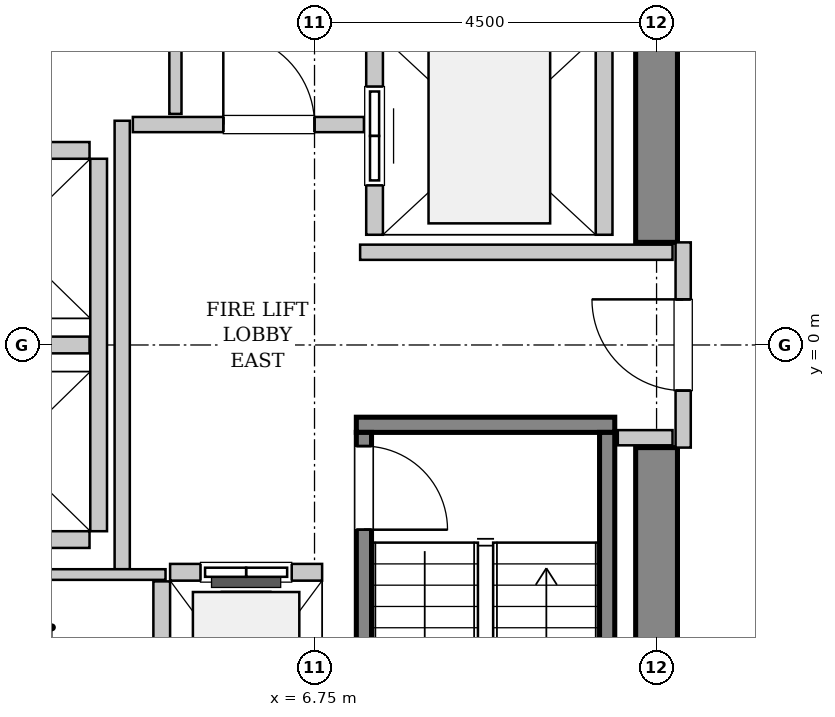
"""IFC4 building model, lengths in metres.
Left out: names, types, materials, properties, quantities, classifications, styles, units other than length and angle.
Written with IfcOpenShell. Run it as: python <this file> out.ifc"""

import sys

from ifc_helpers import new_model, si_unit, direction, frame, frame_2d, origin, place, context, subcontext, project, spatial, rectangle, extrude, source, transform, mapped, element, fill, save


model = new_model("IFC4")
c1 = context("Model", 3, precision=1e-05, world=origin(), true_north=direction((0.0, 1.0)))
c2 = subcontext(c1, "Body", "Model", "MODEL_VIEW")
j1 = project(units=[si_unit("LENGTHUNIT", "METRE"), si_unit("PLANEANGLEUNIT", "RADIAN")], contexts=[c1])
p1 = place(None, origin())
s1 = spatial("IfcSite", under=j1, at=p1, CompositionType="ELEMENT")
p2 = place(p1, origin())
s2 = spatial("IfcBuilding", under=s1, at=p2, CompositionType="ELEMENT")
p3 = place(p2, frame((0.0, 0.0, 121.2)))
s3 = spatial("IfcBuildingStorey", under=s2, at=p3, CompositionType="ELEMENT", Elevation=121.2)
m1 = source(origin(), c2, "Body", "SweptSolid", [
    extrude(rectangle(XDim=7.375, YDim=0.55, at=frame_2d((3.688, 0.0))), origin(), (0.0, 0.0, 1.0), 3.8),
])
for number, where, z_axis, x_axis in (
    (1, (11.25, -8.725, 0.0), (0.0, 0.0, 1.0), (0.0, 1.0, 0.0)),
    (2, (11.25, 1.35, 0.0), (0.0, 0.0, 1.0), (0.0, 1.0, 0.0)),
):
    element("IfcWall", number, at=place(p3, frame(where, z_axis=z_axis, x_axis=x_axis)), inside=s3, PredefinedType="SHEAR", context=c2, shape_type="MappedRepresentation", body=[
        mapped(m1, transform((0.0, 0.0, 0.0), x_axis=(1.0, 0.0, 0.0), y_axis=(0.0, 1.0, 0.0), z_axis=(0.0, 0.0, 1.0), scale=1.0)),
    ])
m2 = source(origin(), c2, "Body", "SweptSolid", [
    extrude(rectangle(XDim=3.4, YDim=0.2, at=frame_2d((1.7, 0.0))), origin(), (0.0, 0.0, 1.0), 3.8),
])
p4 = place(p3, frame((7.3, -1.05, 0.0), z_axis=(0.0, 0.0, 1.0), x_axis=(1.0, 0.0, 0.0)))
e3 = element("IfcWall", 3, at=p4, inside=s3, PredefinedType="SOLIDWALL", context=c2, shape_type="MappedRepresentation", body=[
    mapped(m2, transform((0.0, 0.0, 0.0), x_axis=(1.0, 0.0, 0.0), y_axis=(0.0, 1.0, 0.0), z_axis=(0.0, 0.0, 1.0), scale=1.0)),
])
m3 = source(origin(), c2, "Body", "SweptSolid", [
    extrude(rectangle(XDim=7.1, YDim=0.2, at=frame_2d((3.55, 0.0))), origin(), (0.0, 0.0, 1.0), 3.8),
])
p5 = place(p3, frame((7.4, -1.15, 0.0), z_axis=(0.0, 0.0, 1.0), x_axis=(0.0, -1.0, 0.0)))
e4 = element("IfcWall", 4, at=p5, inside=s3, PredefinedType="SOLIDWALL", context=c2, shape_type="MappedRepresentation", body=[
    mapped(m3, transform((0.0, 0.0, 0.0), x_axis=(1.0, 0.0, 0.0), y_axis=(0.0, 1.0, 0.0), z_axis=(0.0, 0.0, 1.0), scale=1.0)),
])
p6 = place(p5, frame((0.18, 0.0, 0.0)))
e5 = element("IfcOpeningElement", 5, at=p6, cuts=e4, PredefinedType="OPENING", context=c2, shape_type="SweptSolid", body=[
    extrude(rectangle(XDim=1.1, YDim=2.15, at=frame_2d((0.55, 1.075))), frame((0.0, 0.11, 0.0), z_axis=(0.0, -1.0, 0.0), x_axis=(1.0, 0.0, 0.0)), (0.0, 0.0, 1.0), 0.22),
])
p7 = place(p3, frame((10.6, -1.15, 0.0), z_axis=(0.0, 0.0, 1.0), x_axis=(0.0, -1.0, 0.0)))
e6 = element("IfcWall", 6, at=p7, inside=s3, PredefinedType="SOLIDWALL", context=c2, shape_type="MappedRepresentation", body=[
    mapped(m3, transform((0.0, 0.0, 0.0), x_axis=(1.0, 0.0, 0.0), y_axis=(0.0, 1.0, 0.0), z_axis=(0.0, 0.0, 1.0), scale=1.0)),
])
m4 = source(origin(), c2, "Body", "SweptSolid", [
    extrude(rectangle(XDim=2.0, YDim=0.22, at=frame_2d((1.0, 0.0))), origin(), (0.0, 0.0, 1.0), 3.535),
])
p8 = place(p3, frame((6.85, -2.99, 0.0), z_axis=(0.0, 0.0, 1.0), x_axis=(-1.0, 0.0, 0.0)))
e7 = element("IfcWall", 7, at=p8, inside=s3, PredefinedType="SOLIDWALL", context=c2, shape_type="MappedRepresentation", body=[
    mapped(m4, transform((0.0, 0.0, 0.0), x_axis=(1.0, 0.0, 0.0), y_axis=(0.0, 1.0, 0.0), z_axis=(0.0, 0.0, 1.0), scale=1.0)),
])
p9 = place(p8, frame((0.4, 0.0, 0.0)))
e8 = element("IfcOpeningElement", 8, at=p9, cuts=e7, PredefinedType="OPENING", context=c2, shape_type="SweptSolid", body=[
    extrude(rectangle(XDim=1.2, YDim=2.2, at=frame_2d((0.6, 1.1))), frame((0.0, 0.12, 0.0), z_axis=(0.0, -1.0, 0.0), x_axis=(1.0, 0.0, 0.0)), (0.0, 0.0, 1.0), 0.24),
])
m5 = source(origin(), c2, "Body", "SweptSolid", [
    extrude(rectangle(XDim=2.68, YDim=0.22, at=frame_2d((1.34, 0.0))), origin(), (0.0, 0.0, 1.0), 3.535),
])
p10 = place(p3, frame((4.74, -3.11, 0.0), z_axis=(0.0, 0.0, 1.0), x_axis=(0.0, -1.0, 0.0)))
e9 = element("IfcWall", 9, at=p10, inside=s3, PredefinedType="SOLIDWALL", context=c2, shape_type="MappedRepresentation", body=[
    mapped(m5, transform((0.0, 0.0, 0.0), x_axis=(1.0, 0.0, 0.0), y_axis=(0.0, 1.0, 0.0), z_axis=(0.0, 0.0, 1.0), scale=1.0)),
])
m6 = source(origin(), c2, "Body", "SweptSolid", [
    extrude(rectangle(XDim=5.45, YDim=0.22, at=frame_2d((2.725, 0.0))), origin(), (0.0, 0.0, 1.0), 3.535),
])
p11 = place(p3, frame((7.54, 6.9, 0.0), z_axis=(0.0, 0.0, 1.0), x_axis=(0.0, -1.0, 0.0)))
e10 = element("IfcWall", 10, at=p11, inside=s3, PredefinedType="SOLIDWALL", context=c2, shape_type="MappedRepresentation", body=[
    mapped(m6, transform((0.0, 0.0, 0.0), x_axis=(1.0, 0.0, 0.0), y_axis=(0.0, 1.0, 0.0), z_axis=(0.0, 0.0, 1.0), scale=1.0)),
])
p12 = place(p11, frame((3.5, 0.0, 0.0)))
e11 = element("IfcOpeningElement", 11, at=p12, cuts=e10, PredefinedType="OPENING", context=c2, shape_type="SweptSolid", body=[
    extrude(rectangle(XDim=1.3, YDim=2.3, at=frame_2d((0.65, 1.15))), frame((0.0, 0.12, 0.0), z_axis=(0.0, -1.0, 0.0), x_axis=(1.0, 0.0, 0.0)), (0.0, 0.0, 1.0), 0.24),
])
p13 = place(p11, frame((0.65, 0.0, 0.0)))
e12 = element("IfcOpeningElement", 12, at=p13, cuts=e10, PredefinedType="OPENING", context=c2, shape_type="SweptSolid", body=[
    extrude(rectangle(XDim=1.3, YDim=2.3, at=frame_2d((0.65, 1.15))), frame((0.0, 0.12, 0.0), z_axis=(0.0, -1.0, 0.0), x_axis=(1.0, 0.0, 0.0)), (0.0, 0.0, 1.0), 0.24),
])
p14 = place(p3, frame((10.56, 1.45, 0.0), z_axis=(0.0, 0.0, 1.0), x_axis=(0.0, 1.0, 0.0)))
e13 = element("IfcWall", 13, at=p14, inside=s3, PredefinedType="SOLIDWALL", context=c2, shape_type="MappedRepresentation", body=[
    mapped(m6, transform((0.0, 0.0, 0.0), x_axis=(1.0, 0.0, 0.0), y_axis=(0.0, 1.0, 0.0), z_axis=(0.0, 0.0, 1.0), scale=1.0)),
])
m7 = source(origin(), c2, "Body", "SweptSolid", [
    extrude(rectangle(XDim=4.9, YDim=0.22, at=frame_2d((2.45, 0.0))), origin(), (0.0, 0.0, 1.0), 3.535),
])
p15 = place(p3, frame((3.91, -2.45, 0.0), z_axis=(0.0, 0.0, 1.0), x_axis=(0.0, 1.0, 0.0)))
e14 = element("IfcWall", 14, at=p15, inside=s3, PredefinedType="SOLIDWALL", context=c2, shape_type="MappedRepresentation", body=[
    mapped(m7, transform((0.0, 0.0, 0.0), x_axis=(1.0, 0.0, 0.0), y_axis=(0.0, 1.0, 0.0), z_axis=(0.0, 0.0, 1.0), scale=1.0)),
])
m8 = source(origin(), c2, "Body", "SweptSolid", [
    extrude(rectangle(XDim=2.13, YDim=0.22, at=frame_2d((1.065, 0.0))), origin(), (0.0, 0.0, 1.0), 3.535),
])
for number, where, z_axis, x_axis in (
    (15, (1.66, -2.56, 0.0), (0.0, 0.0, 1.0), (1.0, 0.0, 0.0)),
    (16, (1.66, 0.0, 0.0), (0.0, 0.0, 1.0), (1.0, 0.0, 0.0)),
    (17, (3.79, 2.56, 0.0), (0.0, 0.0, 1.0), (-1.0, 0.0, 0.0)),
):
    element("IfcWall", number, at=place(p3, frame(where, z_axis=z_axis, x_axis=x_axis)), inside=s3, PredefinedType="SOLIDWALL", context=c2, shape_type="MappedRepresentation", body=[
        mapped(m8, transform((0.0, 0.0, 0.0), x_axis=(1.0, 0.0, 0.0), y_axis=(0.0, 1.0, 0.0), z_axis=(0.0, 0.0, 1.0), scale=1.0)),
    ])
m9 = source(origin(), c2, "Body", "SweptSolid", [
    extrude(rectangle(XDim=2.7, YDim=0.2, at=frame_2d((1.35, 0.0))), origin(), (0.0, 0.0, 1.0), 2.425),
])
p16 = place(p3, frame((11.6, -1.35, 0.0), z_axis=(0.0, 0.0, 1.0), x_axis=(0.0, 1.0, 0.0)))
e18 = element("IfcWall", 18, at=p16, inside=s3, PredefinedType="PARTITIONING", context=c2, shape_type="MappedRepresentation", body=[
    mapped(m9, transform((0.0, 0.0, 0.0), x_axis=(1.0, 0.0, 0.0), y_axis=(0.0, 1.0, 0.0), z_axis=(0.0, 0.0, 1.0), scale=1.0)),
])
p17 = place(p16, frame((0.75, 0.0, 0.0)))
e19 = element("IfcOpeningElement", 19, at=p17, cuts=e18, PredefinedType="OPENING", context=c2, shape_type="SweptSolid", body=[
    extrude(rectangle(XDim=1.2, YDim=2.15, at=frame_2d((0.6, 1.075))), frame((0.0, 0.11, 0.0), z_axis=(0.0, -1.0, 0.0), x_axis=(1.0, 0.0, 0.0)), (0.0, 0.0, 1.0), 0.22),
])
m10 = source(origin(), c2, "Body", "SweptSolid", [
    extrude(rectangle(XDim=5.9, YDim=0.2, at=frame_2d((2.95, 0.0))), origin(), (0.0, 0.0, 1.0), 3.535),
])
p18 = place(p3, frame((4.22, -2.95, 0.0), z_axis=(0.0, 0.0, 1.0), x_axis=(0.0, 1.0, 0.0)))
e20 = element("IfcWall", 20, at=p18, inside=s3, PredefinedType="PARTITIONING", context=c2, shape_type="MappedRepresentation", body=[
    mapped(m10, transform((0.0, 0.0, 0.0), x_axis=(1.0, 0.0, 0.0), y_axis=(0.0, 1.0, 0.0), z_axis=(0.0, 0.0, 1.0), scale=1.0)),
])
m11 = source(origin(), c2, "Body", "SweptSolid", [
    extrude(rectangle(XDim=3.04, YDim=0.2, at=frame_2d((1.52, 0.0))), origin(), (0.0, 0.0, 1.0), 3.535),
])
p19 = place(p3, frame((4.36, 2.9, 0.0), z_axis=(0.0, 0.0, 1.0), x_axis=(1.0, 0.0, 0.0)))
e21 = element("IfcWall", 21, at=p19, inside=s3, PredefinedType="PARTITIONING", context=c2, shape_type="MappedRepresentation", body=[
    mapped(m11, transform((0.0, 0.0, 0.0), x_axis=(1.0, 0.0, 0.0), y_axis=(0.0, 1.0, 0.0), z_axis=(0.0, 0.0, 1.0), scale=1.0)),
])
p20 = place(p19, frame((1.19, 0.0, 0.0)))
e22 = element("IfcOpeningElement", 22, at=p20, cuts=e21, PredefinedType="OPENING", context=c2, shape_type="SweptSolid", body=[
    extrude(rectangle(XDim=1.2, YDim=2.15, at=frame_2d((0.6, 1.075))), frame((0.0, 0.11, 0.0), z_axis=(0.0, -1.0, 0.0), x_axis=(1.0, 0.0, 0.0)), (0.0, 0.0, 1.0), 0.22),
])
m12 = source(origin(), c2, "Body", "SweptSolid", [
    extrude(rectangle(XDim=4.11, YDim=0.2, at=frame_2d((2.055, 0.0))), origin(), (0.0, 0.0, 1.0), 3.535),
])
p21 = place(p3, frame((7.35, 1.22, 0.0), z_axis=(0.0, 0.0, 1.0), x_axis=(1.0, 0.0, 0.0)))
e23 = element("IfcWall", 23, at=p21, inside=s3, PredefinedType="PARTITIONING", context=c2, shape_type="MappedRepresentation", body=[
    mapped(m12, transform((0.0, 0.0, 0.0), x_axis=(1.0, 0.0, 0.0), y_axis=(0.0, 1.0, 0.0), z_axis=(0.0, 0.0, 1.0), scale=1.0)),
])
m13 = source(origin(), c2, "Body", "SweptSolid", [
    extrude(rectangle(XDim=0.72, YDim=0.2, at=frame_2d((0.36, 0.0))), origin(), (0.0, 0.0, 1.0), 3.535),
])
p22 = place(p3, frame((10.74, -1.22, 0.0), z_axis=(0.0, 0.0, 1.0), x_axis=(1.0, 0.0, 0.0)))
e24 = element("IfcWall", 24, at=p22, inside=s3, PredefinedType="PARTITIONING", context=c2, shape_type="MappedRepresentation", body=[
    mapped(m13, transform((0.0, 0.0, 0.0), x_axis=(1.0, 0.0, 0.0), y_axis=(0.0, 1.0, 0.0), z_axis=(0.0, 0.0, 1.0), scale=1.0)),
])
m14 = source(origin(), c2, "Body", "SweptSolid", [
    extrude(rectangle(XDim=3.015, YDim=0.16, at=frame_2d((1.507, 0.0))), origin(), (0.0, 0.0, 1.0), 3.535),
])
p23 = place(p3, frame((4.92, 3.04, 0.0), z_axis=(0.0, 0.0, 1.0), x_axis=(0.0, 1.0, 0.0)))
e25 = element("IfcWall", 25, at=p23, inside=s3, PredefinedType="PARTITIONING", context=c2, shape_type="MappedRepresentation", body=[
    mapped(m14, transform((0.0, 0.0, 0.0), x_axis=(1.0, 0.0, 0.0), y_axis=(0.0, 1.0, 0.0), z_axis=(0.0, 0.0, 1.0), scale=1.0)),
])
m15 = source(origin(), c2, "Body", "SweptSolid", [
    extrude(rectangle(XDim=3.15, YDim=0.14, at=frame_2d((1.575, 0.0))), origin(), (0.0, 0.0, 1.0), 3.535),
])
p24 = place(p3, frame((1.64, -3.02, 0.0), z_axis=(0.0, 0.0, 1.0), x_axis=(1.0, 0.0, 0.0)))
e26 = element("IfcWall", 26, at=p24, inside=s3, PredefinedType="PARTITIONING", context=c2, shape_type="MappedRepresentation", body=[
    mapped(m15, transform((0.0, 0.0, 0.0), x_axis=(1.0, 0.0, 0.0), y_axis=(0.0, 1.0, 0.0), z_axis=(0.0, 0.0, 1.0), scale=1.0)),
])
m16 = source(origin(), c2, "Body", "SweptSolid", [
    extrude(rectangle(XDim=1.1, YDim=2.15, at=frame_2d((0.55, 1.075))), frame((0.0, 0.025, 0.0), z_axis=(0.0, -1.0, 0.0), x_axis=(1.0, 0.0, 0.0)), (0.0, 0.0, 1.0), 0.05),
])
p25 = place(p6, origin())
e27 = element("IfcDoor", 27, at=p25, inside=s3, OperationType="SINGLE_SWING_RIGHT", PredefinedType="DOOR", context=c2, shape_type="MappedRepresentation", body=[
    mapped(m16, transform((0.0, 0.0, 0.0), x_axis=(1.0, 0.0, 0.0), y_axis=(0.0, 1.0, 0.0), z_axis=(0.0, 0.0, 1.0), scale=1.0)),
])
fill(e5, e27)
m17 = source(origin(), c2, "Body", "SweptSolid", [
    extrude(rectangle(XDim=1.2, YDim=2.2, at=frame_2d((0.6, 1.1))), frame((0.0, 0.025, 0.0), z_axis=(0.0, -1.0, 0.0), x_axis=(1.0, 0.0, 0.0)), (0.0, 0.0, 1.0), 0.05),
])
p26 = place(p9, origin())
e28 = element("IfcDoor", 28, at=p26, inside=s3, OperationType="SLIDING_TO_LEFT", PredefinedType="DOOR", context=c2, shape_type="MappedRepresentation", body=[
    mapped(m17, transform((0.0, 0.0, 0.0), x_axis=(1.0, 0.0, 0.0), y_axis=(0.0, 1.0, 0.0), z_axis=(0.0, 0.0, 1.0), scale=1.0)),
])
fill(e8, e28)
m18 = source(origin(), c2, "Body", "SweptSolid", [
    extrude(rectangle(XDim=1.3, YDim=2.3, at=frame_2d((0.65, 1.15))), frame((0.0, 0.025, 0.0), z_axis=(0.0, -1.0, 0.0), x_axis=(1.0, 0.0, 0.0)), (0.0, 0.0, 1.0), 0.05),
])
p27 = place(p12, origin())
e29 = element("IfcDoor", 29, at=p27, inside=s3, OperationType="SLIDING_TO_RIGHT", PredefinedType="DOOR", context=c2, shape_type="MappedRepresentation", body=[
    mapped(m18, transform((0.0, 0.0, 0.0), x_axis=(1.0, 0.0, 0.0), y_axis=(0.0, 1.0, 0.0), z_axis=(0.0, 0.0, 1.0), scale=1.0)),
])
fill(e11, e29)
m19 = source(origin(), c2, "Body", "SweptSolid", [
    extrude(rectangle(XDim=1.2, YDim=2.15, at=frame_2d((0.6, 1.075))), frame((0.0, 0.025, 0.0), z_axis=(0.0, -1.0, 0.0), x_axis=(1.0, 0.0, 0.0)), (0.0, 0.0, 1.0), 0.05),
])
p28 = place(p17, origin())
e30 = element("IfcDoor", 30, at=p28, inside=s3, OperationType="SINGLE_SWING_RIGHT", PredefinedType="DOOR", context=c2, shape_type="MappedRepresentation", body=[
    mapped(m19, transform((0.0, 0.0, 0.0), x_axis=(1.0, 0.0, 0.0), y_axis=(0.0, 1.0, 0.0), z_axis=(0.0, 0.0, 1.0), scale=1.0)),
])
fill(e19, e30)
p29 = place(p20, origin())
e31 = element("IfcDoor", 31, at=p29, inside=s3, OperationType="SINGLE_SWING_LEFT", PredefinedType="DOOR", context=c2, shape_type="MappedRepresentation", body=[
    mapped(m19, transform((0.0, 0.0, 0.0), x_axis=(1.0, 0.0, 0.0), y_axis=(0.0, 1.0, 0.0), z_axis=(0.0, 0.0, 1.0), scale=1.0)),
])
fill(e22, e31)
save(model, sys.argv[1])
